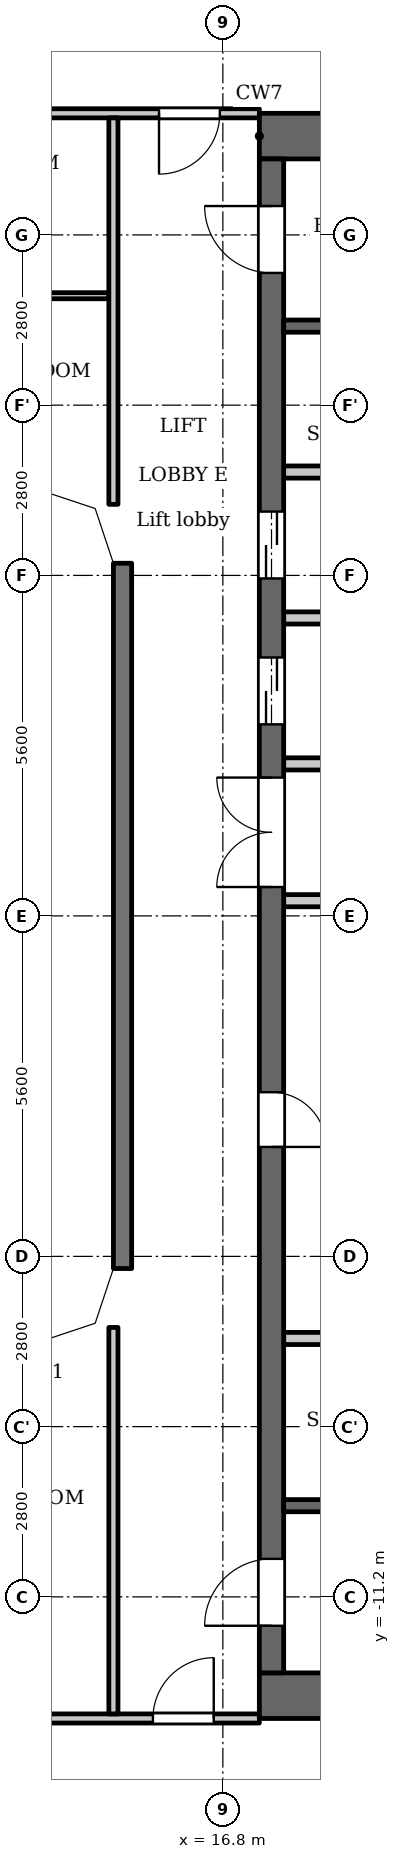
"""IFC4 building model, lengths in metres.
Left out: names, types, materials, properties, quantities, classifications, styles, units other than length and angle.
Written with IfcOpenShell. Run it as: python <this file> out.ifc"""

import sys

from ifc_helpers import new_model, si_unit, direction, frame, frame_2d, origin, place, context, subcontext, project, spatial, polyline, rectangle, outline, extrude, element, fill, save


model = new_model("IFC4")
c1 = context("Model", 3, precision=1e-05, world=origin(), true_north=direction((0.0, 1.0)))
c2 = subcontext(c1, "Body", "Model", "MODEL_VIEW")
j1 = project(units=[si_unit("LENGTHUNIT", "METRE"), si_unit("PLANEANGLEUNIT", "RADIAN")], contexts=[c1])
p1 = place(None, origin())
s1 = spatial("IfcSite", under=j1, at=p1, CompositionType="ELEMENT")
p2 = place(p1, origin())
s2 = spatial("IfcBuilding", under=s1, at=p2, CompositionType="ELEMENT")
p3 = place(p2, frame((0.0, 0.0, 209.9)))
s3 = spatial("IfcBuildingStorey", under=s2, at=p3, CompositionType="ELEMENT", Elevation=209.9)
p4 = place(p3, frame((15.15, 5.8, 0.0), z_axis=(0.0, 0.0, 1.0), x_axis=(0.0, -1.0, 0.0)))
e1 = element("IfcWall", 1, at=p4, inside=s3, PredefinedType="SOLIDWALL", context=c2, shape_type="SweptSolid", body=[
    extrude(rectangle(XDim=11.6, YDim=0.3, at=frame_2d((5.8, 0.0))), origin(), (0.0, 0.0, 1.0), 3.2),
])
for number, where, z_axis, x_axis in (
    (2, (17.4, 12.825, 0.0), (0.0, 0.0, 1.0), (1.0, 0.0, 0.0)),
    (3, (17.4, -12.825, 0.0), (0.0, 0.0, 1.0), (1.0, 0.0, 0.0)),
):
    element("IfcWall", number, at=place(p3, frame(where, z_axis=z_axis, x_axis=x_axis)), inside=s3, PredefinedType="SHEAR", context=c2, shape_type="SweptSolid", body=[
        extrude(rectangle(XDim=7.6, YDim=0.75, at=frame_2d((3.8, 0.0))), origin(), (0.0, 0.0, 1.0), 3.2),
    ])
p5 = place(p3, frame((17.6, -12.45, 0.0), z_axis=(0.0, 0.0, 1.0), x_axis=(0.0, 1.0, 0.0)))
e4 = element("IfcWall", 4, at=p5, inside=s3, PredefinedType="SHEAR", context=c2, shape_type="SweptSolid", body=[
    extrude(rectangle(XDim=24.9, YDim=0.4, at=frame_2d((12.45, 0.0))), origin(), (0.0, 0.0, 1.0), 3.2),
])
p6 = place(p5, frame((8.65, 0.0, 0.0)))
e5 = element("IfcOpeningElement", 5, at=p6, cuts=e4, PredefinedType="OPENING", context=c2, shape_type="SweptSolid", body=[
    extrude(rectangle(XDim=0.9, YDim=2.1, at=frame_2d((0.45, 1.05))), frame((0.0, 0.21, 0.0), z_axis=(0.0, -1.0, 0.0), x_axis=(1.0, 0.0, 0.0)), (0.0, 0.0, 1.0), 0.42),
])
p7 = place(p5, frame((15.6, 0.0, 0.0)))
e6 = element("IfcOpeningElement", 6, at=p7, cuts=e4, PredefinedType="OPENING", context=c2, shape_type="SweptSolid", body=[
    extrude(rectangle(XDim=1.1, YDim=2.1, at=frame_2d((0.55, 1.05))), frame((0.0, 0.21, 0.0), z_axis=(0.0, -1.0, 0.0), x_axis=(1.0, 0.0, 0.0)), (0.0, 0.0, 1.0), 0.42),
])
p8 = place(p5, frame((18.0, 0.0, 0.0)))
e7 = element("IfcOpeningElement", 7, at=p8, cuts=e4, PredefinedType="OPENING", context=c2, shape_type="SweptSolid", body=[
    extrude(rectangle(XDim=1.1, YDim=2.1, at=frame_2d((0.55, 1.05))), frame((0.0, 0.21, 0.0), z_axis=(0.0, -1.0, 0.0), x_axis=(1.0, 0.0, 0.0)), (0.0, 0.0, 1.0), 0.42),
])
p9 = place(p5, frame((23.025, 0.0, 0.0)))
e8 = element("IfcOpeningElement", 8, at=p9, cuts=e4, PredefinedType="OPENING", context=c2, shape_type="SweptSolid", body=[
    extrude(rectangle(XDim=1.1, YDim=2.1, at=frame_2d((0.55, 1.05))), frame((0.0, 0.21, 0.0), z_axis=(0.0, -1.0, 0.0), x_axis=(1.0, 0.0, 0.0)), (0.0, 0.0, 1.0), 0.42),
])
p10 = place(p5, frame((0.775, 0.0, 0.0)))
e9 = element("IfcOpeningElement", 9, at=p10, cuts=e4, PredefinedType="OPENING", context=c2, shape_type="SweptSolid", body=[
    extrude(rectangle(XDim=1.1, YDim=2.1, at=frame_2d((0.55, 1.05))), frame((0.0, 0.21, 0.0), z_axis=(0.0, -1.0, 0.0), x_axis=(1.0, 0.0, 0.0)), (0.0, 0.0, 1.0), 0.42),
])
p11 = place(p5, frame((12.925, 0.0, 0.0)))
e10 = element("IfcOpeningElement", 10, at=p11, cuts=e4, PredefinedType="OPENING", context=c2, shape_type="SweptSolid", body=[
    extrude(rectangle(XDim=1.8, YDim=2.1, at=frame_2d((0.9, 1.05))), frame((0.0, 0.21, 0.0), z_axis=(0.0, -1.0, 0.0), x_axis=(1.0, 0.0, 0.0)), (0.0, 0.0, 1.0), 0.42),
])
p12 = place(p3, frame((17.8, -9.7, 0.0), z_axis=(0.0, 0.0, 1.0), x_axis=(1.0, 0.0, 0.0)))
e11 = element("IfcWall", 11, at=p12, inside=s3, PredefinedType="SHEAR", context=c2, shape_type="SweptSolid", body=[
    extrude(rectangle(XDim=5.65, YDim=0.2, at=frame_2d((2.825, 0.0))), origin(), (0.0, 0.0, 1.0), 3.2),
])
p13 = place(p12, frame((0.85, 0.0, 0.0)))
e12 = element("IfcOpeningElement", 12, at=p13, cuts=e11, PredefinedType="OPENING", context=c2, shape_type="SweptSolid", body=[
    extrude(rectangle(XDim=1.1, YDim=2.1, at=frame_2d((0.55, 1.05))), frame((0.0, 0.11, 0.0), z_axis=(0.0, -1.0, 0.0), x_axis=(1.0, 0.0, 0.0)), (0.0, 0.0, 1.0), 0.22),
])
p14 = place(p12, frame((3.75, 0.0, 0.0)))
e13 = element("IfcOpeningElement", 13, at=p14, cuts=e11, PredefinedType="OPENING", context=c2, shape_type="SweptSolid", body=[
    extrude(rectangle(XDim=1.1, YDim=2.1, at=frame_2d((0.55, 1.05))), frame((0.0, 0.11, 0.0), z_axis=(0.0, -1.0, 0.0), x_axis=(1.0, 0.0, 0.0)), (0.0, 0.0, 1.0), 0.22),
])
p15 = place(p3, frame((17.8, -6.95, 0.0), z_axis=(0.0, 0.0, 1.0), x_axis=(1.0, 0.0, 0.0)))
e14 = element("IfcWall", 14, at=p15, inside=s3, PredefinedType="PARTITIONING", context=c2, shape_type="SweptSolid", body=[
    extrude(rectangle(XDim=2.8, YDim=0.2, at=frame_2d((1.4, 0.0))), origin(), (0.0, 0.0, 1.0), 3.2),
])
p16 = place(p3, frame((17.8, 0.25, 0.0), z_axis=(0.0, 0.0, 1.0), x_axis=(1.0, 0.0, 0.0)))
e15 = element("IfcWall", 15, at=p16, inside=s3, PredefinedType="PARTITIONING", context=c2, shape_type="SweptSolid", body=[
    extrude(rectangle(XDim=3.0, YDim=0.2, at=frame_2d((1.5, 0.0))), origin(), (0.0, 0.0, 1.0), 3.2),
])
p17 = place(p16, frame((1.98, 0.0, 0.0)))
e16 = element("IfcOpeningElement", 16, at=p17, cuts=e15, PredefinedType="OPENING", context=c2, shape_type="SweptSolid", body=[
    extrude(rectangle(XDim=0.9, YDim=2.1, at=frame_2d((0.45, 1.05))), frame((0.0, 0.11, 0.0), z_axis=(0.0, -1.0, 0.0), x_axis=(1.0, 0.0, 0.0)), (0.0, 0.0, 1.0), 0.22),
])
p18 = place(p3, frame((17.8, 2.5, 0.0), z_axis=(0.0, 0.0, 1.0), x_axis=(1.0, 0.0, 0.0)))
e17 = element("IfcWall", 17, at=p18, inside=s3, PredefinedType="PARTITIONING", context=c2, shape_type="SweptSolid", body=[
    extrude(rectangle(XDim=3.0, YDim=0.2, at=frame_2d((1.5, 0.0))), origin(), (0.0, 0.0, 1.0), 3.2),
])
for number, where, z_axis, x_axis in (
    (18, (17.8, 4.9, 0.0), (0.0, 0.0, 1.0), (1.0, 0.0, 0.0)),
    (19, (17.8, 7.3, 0.0), (0.0, 0.0, 1.0), (1.0, 0.0, 0.0)),
):
    element("IfcWall", number, at=place(p3, frame(where, z_axis=z_axis, x_axis=x_axis)), inside=s3, PredefinedType="PARTITIONING", context=c2, shape_type="SweptSolid", body=[
        extrude(rectangle(XDim=2.8, YDim=0.2, at=frame_2d((1.4, 0.0))), origin(), (0.0, 0.0, 1.0), 3.2),
    ])
p19 = place(p3, frame((17.8, 9.7, 0.0), z_axis=(0.0, 0.0, 1.0), x_axis=(1.0, 0.0, 0.0)))
e20 = element("IfcWall", 20, at=p19, inside=s3, PredefinedType="SHEAR", context=c2, shape_type="SweptSolid", body=[
    extrude(rectangle(XDim=5.65, YDim=0.2, at=frame_2d((2.825, 0.0))), origin(), (0.0, 0.0, 1.0), 3.2),
])
p20 = place(p19, frame((0.85, 0.0, 0.0)))
e21 = element("IfcOpeningElement", 21, at=p20, cuts=e20, PredefinedType="OPENING", context=c2, shape_type="SweptSolid", body=[
    extrude(rectangle(XDim=1.1, YDim=2.1, at=frame_2d((0.55, 1.05))), frame((0.0, 0.11, 0.0), z_axis=(0.0, -1.0, 0.0), x_axis=(1.0, 0.0, 0.0)), (0.0, 0.0, 1.0), 0.22),
])
p21 = place(p19, frame((3.75, 0.0, 0.0)))
e22 = element("IfcOpeningElement", 22, at=p21, cuts=e20, PredefinedType="OPENING", context=c2, shape_type="SweptSolid", body=[
    extrude(rectangle(XDim=1.1, YDim=2.1, at=frame_2d((0.55, 1.05))), frame((0.0, 0.11, 0.0), z_axis=(0.0, -1.0, 0.0), x_axis=(1.0, 0.0, 0.0)), (0.0, 0.0, 1.0), 0.22),
])
p22 = place(p3, frame((-17.4, -13.2, 0.0), z_axis=(0.0, 0.0, 1.0), x_axis=(1.0, 0.0, 0.0)))
e23 = element("IfcWall", 23, at=p22, inside=s3, PredefinedType="PARTITIONING", context=c2, shape_type="SweptSolid", body=[
    extrude(rectangle(XDim=34.8, YDim=0.15, at=frame_2d((17.4, 0.0))), origin(), (0.0, 0.0, 1.0), 3.2),
])
p23 = place(p22, frame((0.65, 0.0, 0.0)))
e24 = element("IfcOpeningElement", 24, at=p23, cuts=e23, PredefinedType="OPENING", context=c2, shape_type="SweptSolid", body=[
    extrude(rectangle(XDim=1.0, YDim=2.1, at=frame_2d((0.5, 1.05))), frame((0.0, 0.085, 0.0), z_axis=(0.0, -1.0, 0.0), x_axis=(1.0, 0.0, 0.0)), (0.0, 0.0, 1.0), 0.17),
])
p24 = place(p22, frame((33.05, 0.0, 0.0)))
e25 = element("IfcOpeningElement", 25, at=p24, cuts=e23, PredefinedType="OPENING", context=c2, shape_type="SweptSolid", body=[
    extrude(rectangle(XDim=1.0, YDim=2.1, at=frame_2d((0.5, 1.05))), frame((0.0, 0.085, 0.0), z_axis=(0.0, -1.0, 0.0), x_axis=(1.0, 0.0, 0.0)), (0.0, 0.0, 1.0), 0.17),
])
p25 = place(p22, frame((4.55, 0.0, 0.0)))
e26 = element("IfcOpeningElement", 26, at=p25, cuts=e23, PredefinedType="OPENING", context=c2, shape_type="SweptSolid", body=[
    extrude(rectangle(XDim=1.0, YDim=2.1, at=frame_2d((0.5, 1.05))), frame((0.0, 0.085, 0.0), z_axis=(0.0, -1.0, 0.0), x_axis=(1.0, 0.0, 0.0)), (0.0, 0.0, 1.0), 0.17),
])
p26 = place(p22, frame((6.9, 0.0, 0.0)))
e27 = element("IfcOpeningElement", 27, at=p26, cuts=e23, PredefinedType="OPENING", context=c2, shape_type="SweptSolid", body=[
    extrude(rectangle(XDim=1.0, YDim=2.1, at=frame_2d((0.5, 1.05))), frame((0.0, 0.085, 0.0), z_axis=(0.0, -1.0, 0.0), x_axis=(1.0, 0.0, 0.0)), (0.0, 0.0, 1.0), 0.17),
])
p27 = place(p22, frame((15.75, 0.0, 0.0)))
e28 = element("IfcOpeningElement", 28, at=p27, cuts=e23, PredefinedType="OPENING", context=c2, shape_type="SweptSolid", body=[
    extrude(rectangle(XDim=1.0, YDim=2.1, at=frame_2d((0.5, 1.05))), frame((0.0, 0.085, 0.0), z_axis=(0.0, -1.0, 0.0), x_axis=(1.0, 0.0, 0.0)), (0.0, 0.0, 1.0), 0.17),
])
p28 = place(p22, frame((18.1, 0.0, 0.0)))
e29 = element("IfcOpeningElement", 29, at=p28, cuts=e23, PredefinedType="OPENING", context=c2, shape_type="SweptSolid", body=[
    extrude(rectangle(XDim=1.0, YDim=2.1, at=frame_2d((0.5, 1.05))), frame((0.0, 0.085, 0.0), z_axis=(0.0, -1.0, 0.0), x_axis=(1.0, 0.0, 0.0)), (0.0, 0.0, 1.0), 0.17),
])
p29 = place(p22, frame((26.95, 0.0, 0.0)))
e30 = element("IfcOpeningElement", 30, at=p29, cuts=e23, PredefinedType="OPENING", context=c2, shape_type="SweptSolid", body=[
    extrude(rectangle(XDim=1.0, YDim=2.1, at=frame_2d((0.5, 1.05))), frame((0.0, 0.085, 0.0), z_axis=(0.0, -1.0, 0.0), x_axis=(1.0, 0.0, 0.0)), (0.0, 0.0, 1.0), 0.17),
])
p30 = place(p22, frame((29.25, 0.0, 0.0)))
e31 = element("IfcOpeningElement", 31, at=p30, cuts=e23, PredefinedType="OPENING", context=c2, shape_type="SweptSolid", body=[
    extrude(rectangle(XDim=1.0, YDim=2.1, at=frame_2d((0.5, 1.05))), frame((0.0, 0.085, 0.0), z_axis=(0.0, -1.0, 0.0), x_axis=(1.0, 0.0, 0.0)), (0.0, 0.0, 1.0), 0.17),
])
p31 = place(p3, frame((-14.925, 10.2, 0.0), z_axis=(0.0, 0.0, 1.0), x_axis=(1.0, 0.0, 0.0)))
e32 = element("IfcWall", 32, at=p31, inside=s3, PredefinedType="PARTITIONING", context=c2, shape_type="SweptSolid", body=[
    extrude(rectangle(XDim=29.85, YDim=0.1, at=frame_2d((14.925, 0.0))), origin(), (0.0, 0.0, 1.0), 3.2),
])
p32 = place(p31, frame((13.475, 0.0, 0.0)))
e33 = element("IfcOpeningElement", 33, at=p32, cuts=e32, PredefinedType="OPENING", context=c2, shape_type="SweptSolid", body=[
    extrude(rectangle(XDim=0.9, YDim=2.1, at=frame_2d((0.45, 1.05))), frame((0.0, 0.06, 0.0), z_axis=(0.0, -1.0, 0.0), x_axis=(1.0, 0.0, 0.0)), (0.0, 0.0, 1.0), 0.12),
])
p33 = place(p31, frame((4.375, 0.0, 0.0)))
e34 = element("IfcOpeningElement", 34, at=p33, cuts=e32, PredefinedType="OPENING", context=c2, shape_type="SweptSolid", body=[
    extrude(rectangle(XDim=0.9, YDim=2.1, at=frame_2d((0.45, 1.05))), frame((0.0, 0.06, 0.0), z_axis=(0.0, -1.0, 0.0), x_axis=(1.0, 0.0, 0.0)), (0.0, 0.0, 1.0), 0.12),
])
p34 = place(p31, frame((19.075, 0.0, 0.0)))
e35 = element("IfcOpeningElement", 35, at=p34, cuts=e32, PredefinedType="OPENING", context=c2, shape_type="SweptSolid", body=[
    extrude(rectangle(XDim=0.9, YDim=2.1, at=frame_2d((0.45, 1.05))), frame((0.0, 0.06, 0.0), z_axis=(0.0, -1.0, 0.0), x_axis=(1.0, 0.0, 0.0)), (0.0, 0.0, 1.0), 0.12),
])
p35 = place(p31, frame((21.175, 0.0, 0.0)))
e36 = element("IfcOpeningElement", 36, at=p35, cuts=e32, PredefinedType="OPENING", context=c2, shape_type="SweptSolid", body=[
    extrude(rectangle(XDim=0.9, YDim=2.1, at=frame_2d((0.45, 1.05))), frame((0.0, 0.06, 0.0), z_axis=(0.0, -1.0, 0.0), x_axis=(1.0, 0.0, 0.0)), (0.0, 0.0, 1.0), 0.12),
])
p36 = place(p3, frame((-17.4, 13.2, 0.0), z_axis=(0.0, 0.0, 1.0), x_axis=(1.0, 0.0, 0.0)))
e37 = element("IfcWall", 37, at=p36, inside=s3, PredefinedType="PARTITIONING", context=c2, shape_type="SweptSolid", body=[
    extrude(rectangle(XDim=34.8, YDim=0.15, at=frame_2d((17.4, 0.0))), origin(), (0.0, 0.0, 1.0), 3.2),
])
p37 = place(p36, frame((0.75, 0.0, 0.0)))
e38 = element("IfcOpeningElement", 38, at=p37, cuts=e37, PredefinedType="OPENING", context=c2, shape_type="SweptSolid", body=[
    extrude(rectangle(XDim=1.0, YDim=2.1, at=frame_2d((0.5, 1.05))), frame((0.0, 0.085, 0.0), z_axis=(0.0, -1.0, 0.0), x_axis=(1.0, 0.0, 0.0)), (0.0, 0.0, 1.0), 0.17),
])
p38 = place(p36, frame((33.15, 0.0, 0.0)))
e39 = element("IfcOpeningElement", 39, at=p38, cuts=e37, PredefinedType="OPENING", context=c2, shape_type="SweptSolid", body=[
    extrude(rectangle(XDim=1.0, YDim=2.1, at=frame_2d((0.5, 1.05))), frame((0.0, 0.085, 0.0), z_axis=(0.0, -1.0, 0.0), x_axis=(1.0, 0.0, 0.0)), (0.0, 0.0, 1.0), 0.17),
])
p39 = place(p36, frame((12.45, 0.0, 0.0)))
e40 = element("IfcOpeningElement", 40, at=p39, cuts=e37, PredefinedType="OPENING", context=c2, shape_type="SweptSolid", body=[
    extrude(rectangle(XDim=1.0, YDim=2.1, at=frame_2d((0.5, 1.05))), frame((0.0, 0.085, 0.0), z_axis=(0.0, -1.0, 0.0), x_axis=(1.0, 0.0, 0.0)), (0.0, 0.0, 1.0), 0.17),
])
p40 = place(p36, frame((18.05, 0.0, 0.0)))
e41 = element("IfcOpeningElement", 41, at=p40, cuts=e37, PredefinedType="OPENING", context=c2, shape_type="SweptSolid", body=[
    extrude(rectangle(XDim=1.0, YDim=2.1, at=frame_2d((0.5, 1.05))), frame((0.0, 0.085, 0.0), z_axis=(0.0, -1.0, 0.0), x_axis=(1.0, 0.0, 0.0)), (0.0, 0.0, 1.0), 0.17),
])
for number, where, z_axis, x_axis in (
    (42, (15.0, -13.125, 0.0), (0.0, 0.0, 1.0), (0.0, 1.0, 0.0)),
    (43, (15.0, 6.769, 0.0), (0.0, 0.0, 1.0), (0.0, 1.0, 0.0)),
):
    element("IfcWall", number, at=place(p3, frame(where, z_axis=z_axis, x_axis=x_axis)), inside=s3, PredefinedType="PARTITIONING", context=c2, shape_type="SweptSolid", body=[
        extrude(rectangle(XDim=6.356, YDim=0.15, at=frame_2d((3.178, 0.0))), origin(), (0.0, 0.0, 1.0), 3.2),
    ])
p41 = place(p3, origin())
e44 = element("IfcWall", 44, at=p41, inside=s3, PredefinedType="SOLIDWALL", context=c2, shape_type="SweptSolid", body=[
    extrude(outline(polyline([(14.937, 6.937), (13.849, 7.3), (13.8, 7.3), (13.8, 7.0), (14.7, 6.7), (15.0, 5.8), (15.3, 5.8), (15.3, 5.849), (14.937, 6.937)])), origin(), (0.0, 0.0, 1.0), 3.2),
])
e45 = element("IfcWall", 45, at=p41, inside=s3, PredefinedType="SOLIDWALL", context=c2, shape_type="SweptSolid", body=[
    extrude(outline(polyline([(14.937, -6.937), (15.3, -5.849), (15.3, -5.8), (15.0, -5.8), (14.7, -6.7), (13.8, -7.0), (13.8, -7.3), (13.849, -7.3), (14.937, -6.937)])), origin(), (0.0, 0.0, 1.0), 3.2),
])
p42 = place(p6, origin())
e46 = element("IfcDoor", 46, at=p42, inside=s3, OperationType="SINGLE_SWING_LEFT", PredefinedType="DOOR", context=c2, shape_type="SweptSolid", body=[
    extrude(rectangle(XDim=0.9, YDim=2.1, at=frame_2d((0.45, 1.05))), frame((0.0, 0.025, 0.0), z_axis=(0.0, -1.0, 0.0), x_axis=(1.0, 0.0, 0.0)), (0.0, 0.0, 1.0), 0.05),
])
fill(e5, e46)
p43 = place(p7, origin())
e47 = element("IfcDoor", 47, at=p43, inside=s3, OperationType="DOUBLE_DOOR_SLIDING", PredefinedType="DOOR", context=c2, shape_type="SweptSolid", body=[
    extrude(rectangle(XDim=1.1, YDim=2.1, at=frame_2d((0.55, 1.05))), frame((0.0, 0.025, 0.0), z_axis=(0.0, -1.0, 0.0), x_axis=(1.0, 0.0, 0.0)), (0.0, 0.0, 1.0), 0.05),
])
fill(e6, e47)
p44 = place(p8, origin())
e48 = element("IfcDoor", 48, at=p44, inside=s3, OperationType="DOUBLE_DOOR_SLIDING", PredefinedType="DOOR", context=c2, shape_type="SweptSolid", body=[
    extrude(rectangle(XDim=1.1, YDim=2.1, at=frame_2d((0.55, 1.05))), frame((0.0, 0.025, 0.0), z_axis=(0.0, -1.0, 0.0), x_axis=(1.0, 0.0, 0.0)), (0.0, 0.0, 1.0), 0.05),
])
fill(e7, e48)
p45 = place(p9, origin())
e49 = element("IfcDoor", 49, at=p45, inside=s3, OperationType="SINGLE_SWING_LEFT", PredefinedType="DOOR", context=c2, shape_type="SweptSolid", body=[
    extrude(rectangle(XDim=1.1, YDim=2.1, at=frame_2d((0.55, 1.05))), frame((0.0, 0.025, 0.0), z_axis=(0.0, -1.0, 0.0), x_axis=(1.0, 0.0, 0.0)), (0.0, 0.0, 1.0), 0.05),
])
fill(e8, e49)
p46 = place(p10, origin())
e50 = element("IfcDoor", 50, at=p46, inside=s3, OperationType="SINGLE_SWING_RIGHT", PredefinedType="DOOR", context=c2, shape_type="SweptSolid", body=[
    extrude(rectangle(XDim=1.1, YDim=2.1, at=frame_2d((0.55, 1.05))), frame((0.0, 0.025, 0.0), z_axis=(0.0, -1.0, 0.0), x_axis=(1.0, 0.0, 0.0)), (0.0, 0.0, 1.0), 0.05),
])
fill(e9, e50)
p47 = place(p11, origin())
e51 = element("IfcDoor", 51, at=p47, inside=s3, OperationType="DOUBLE_DOOR_SINGLE_SWING", PredefinedType="DOOR", context=c2, shape_type="SweptSolid", body=[
    extrude(rectangle(XDim=1.8, YDim=2.1, at=frame_2d((0.9, 1.05))), frame((0.0, 0.025, 0.0), z_axis=(0.0, -1.0, 0.0), x_axis=(1.0, 0.0, 0.0)), (0.0, 0.0, 1.0), 0.05),
])
fill(e10, e51)
p48 = place(p38, origin())
e52 = element("IfcDoor", 52, at=p48, inside=s3, OperationType="SINGLE_SWING_LEFT", PredefinedType="DOOR", context=c2, shape_type="SweptSolid", body=[
    extrude(rectangle(XDim=1.0, YDim=2.1, at=frame_2d((0.5, 1.05))), frame((0.0, 0.025, 0.0), z_axis=(0.0, -1.0, 0.0), x_axis=(1.0, 0.0, 0.0)), (0.0, 0.0, 1.0), 0.05),
])
fill(e39, e52)
p49 = place(p24, origin())
e53 = element("IfcDoor", 53, at=p49, inside=s3, OperationType="SINGLE_SWING_LEFT", PredefinedType="DOOR", context=c2, shape_type="SweptSolid", body=[
    extrude(rectangle(XDim=1.0, YDim=2.1, at=frame_2d((0.5, 1.05))), frame((0.0, 0.025, 0.0), z_axis=(0.0, -1.0, 0.0), x_axis=(1.0, 0.0, 0.0)), (0.0, 0.0, 1.0), 0.05),
])
fill(e25, e53)
save(model, sys.argv[1])
